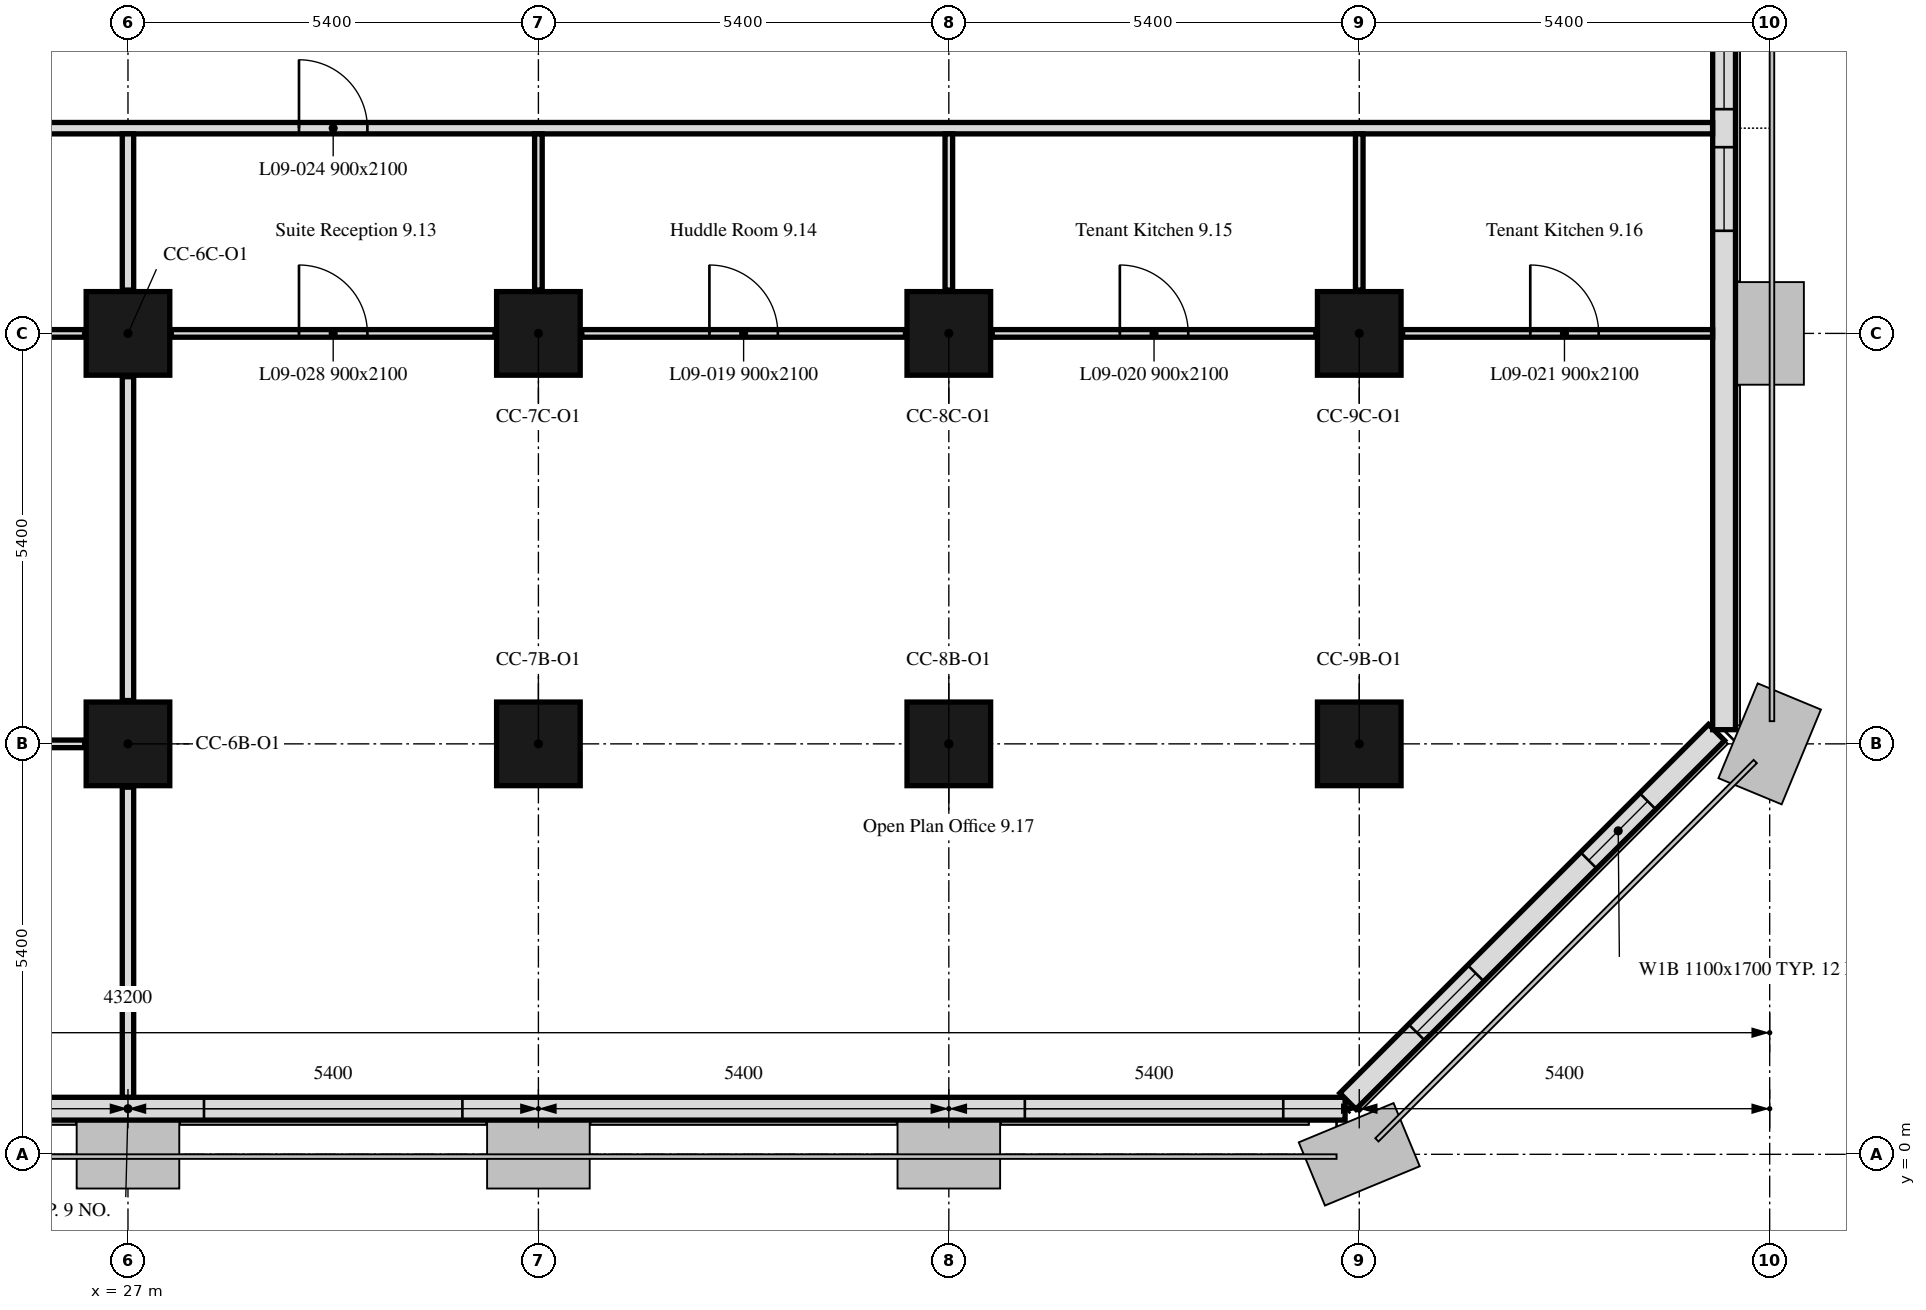
"""IFC4 building model, lengths in metres.
Left out: names, types, materials, properties, quantities, classifications, styles, units other than length and angle.
Written with IfcOpenShell. Run it as: python <this file> out.ifc"""

import sys

from ifc_helpers import new_model, si_unit, direction, frame, frame_2d, origin, origin_2d, place, context, subcontext, project, spatial, rectangle, extrude, element, fill, save


model = new_model("IFC4")
c1 = context("Model", 3, precision=1e-05, world=origin(), true_north=direction((0.0, 1.0)))
c2 = subcontext(c1, "Body", "Model", "MODEL_VIEW")
j1 = project(units=[si_unit("LENGTHUNIT", "METRE"), si_unit("PLANEANGLEUNIT", "RADIAN")], contexts=[c1])
p1 = place(None, origin())
s1 = spatial("IfcSite", under=j1, at=p1, CompositionType="ELEMENT")
p2 = place(p1, origin())
s2 = spatial("IfcBuilding", under=s1, at=p2, CompositionType="ELEMENT")
p3 = place(p2, frame((0.0, 0.0, 45.0)))
s3 = spatial("IfcBuildingStorey", under=s2, at=p3, CompositionType="ELEMENT", Elevation=45.0)
for number, where, z_axis, x_axis in (
    (1, (27.0, 5.4, 0.0), (0.0, 0.0, 1.0), (1.0, 0.0, 0.0)),
    (2, (32.4, 5.4, 0.0), (0.0, 0.0, 1.0), (1.0, 0.0, 0.0)),
    (3, (37.8, 5.4, 0.0), (0.0, 0.0, 1.0), (1.0, 0.0, 0.0)),
    (4, (43.2, 5.4, 0.0), (0.0, 0.0, 1.0), (1.0, 0.0, 0.0)),
    (5, (27.0, 10.8, 0.0), (0.0, 0.0, 1.0), (1.0, 0.0, 0.0)),
    (6, (32.4, 10.8, 0.0), (0.0, 0.0, 1.0), (1.0, 0.0, 0.0)),
    (7, (37.8, 10.8, 0.0), (0.0, 0.0, 1.0), (1.0, 0.0, 0.0)),
    (8, (43.2, 10.8, 0.0), (0.0, 0.0, 1.0), (1.0, 0.0, 0.0)),
):
    element("IfcColumn", number, at=place(p3, frame(where, z_axis=z_axis, x_axis=x_axis)), inside=s3, PredefinedType="COLUMN", context=c2, shape_type="SweptSolid", body=[
        extrude(rectangle(XDim=1.1, YDim=1.1, at=origin_2d()), origin(), (0.0, 0.0, 1.0), 3.5),
    ])
p4 = place(p3, frame((10.986, 0.6, 0.0), z_axis=(0.0, 0.0, 1.0), x_axis=(1.0, 0.0, 0.0)))
e9 = element("IfcWall", 9, at=p4, inside=s3, PredefinedType="SOLIDWALL", context=c2, shape_type="SweptSolid", body=[
    extrude(rectangle(XDim=32.027, YDim=0.3, at=frame_2d((16.014, 0.0))), origin(), (0.0, 0.0, 1.0), 3.5),
])
p5 = place(p4, frame((6.214, 0.0, 0.9)))
e10 = element("IfcOpeningElement", 10, at=p5, cuts=e9, PredefinedType="OPENING", context=c2, shape_type="SweptSolid", body=[
    extrude(rectangle(XDim=3.4, YDim=1.7, at=frame_2d((1.7, 0.85))), frame((0.0, 0.16, 0.0), z_axis=(0.0, -1.0, 0.0), x_axis=(1.0, 0.0, 0.0)), (0.0, 0.0, 1.0), 0.32),
])
p6 = place(p4, frame((17.014, 0.0, 0.9)))
e11 = element("IfcOpeningElement", 11, at=p6, cuts=e9, PredefinedType="OPENING", context=c2, shape_type="SweptSolid", body=[
    extrude(rectangle(XDim=3.4, YDim=1.7, at=frame_2d((1.7, 0.85))), frame((0.0, 0.16, 0.0), z_axis=(0.0, -1.0, 0.0), x_axis=(1.0, 0.0, 0.0)), (0.0, 0.0, 1.0), 0.32),
])
p7 = place(p4, frame((27.814, 0.0, 0.9)))
e12 = element("IfcOpeningElement", 12, at=p7, cuts=e9, PredefinedType="OPENING", context=c2, shape_type="SweptSolid", body=[
    extrude(rectangle(XDim=3.4, YDim=1.7, at=frame_2d((1.7, 0.85))), frame((0.0, 0.16, 0.0), z_axis=(0.0, -1.0, 0.0), x_axis=(1.0, 0.0, 0.0)), (0.0, 0.0, 1.0), 0.32),
])
p8 = place(p3, frame((43.051, 0.699, 0.0), z_axis=(0.0, 0.0, 1.0), x_axis=(0.707106781187, 0.707106781187, 0.0)))
e13 = element("IfcWall", 13, at=p8, inside=s3, PredefinedType="SOLIDWALL", context=c2, shape_type="SweptSolid", body=[
    extrude(rectangle(XDim=6.86, YDim=0.3, at=frame_2d((3.43, 0.0))), origin(), (0.0, 0.0, 1.0), 3.5),
])
p9 = place(p8, frame((1.28, 0.0, 0.9)))
e14 = element("IfcOpeningElement", 14, at=p9, cuts=e13, PredefinedType="OPENING", context=c2, shape_type="SweptSolid", body=[
    extrude(rectangle(XDim=1.1, YDim=1.7, at=frame_2d((0.55, 0.85))), frame((0.0, 0.16, 0.0), z_axis=(0.0, -1.0, 0.0), x_axis=(1.0, 0.0, 0.0)), (0.0, 0.0, 1.0), 0.32),
])
p10 = place(p8, frame((4.48, 0.0, 0.9)))
e15 = element("IfcOpeningElement", 15, at=p10, cuts=e13, PredefinedType="OPENING", context=c2, shape_type="SweptSolid", body=[
    extrude(rectangle(XDim=1.1, YDim=1.7, at=frame_2d((0.55, 0.85))), frame((0.0, 0.16, 0.0), z_axis=(0.0, -1.0, 0.0), x_axis=(1.0, 0.0, 0.0)), (0.0, 0.0, 1.0), 0.32),
])
p11 = place(p3, frame((48.0, 5.586, 0.0), z_axis=(0.0, 0.0, 1.0), x_axis=(0.0, 1.0, 0.0)))
e16 = element("IfcWall", 16, at=p11, inside=s3, PredefinedType="SOLIDWALL", context=c2, shape_type="SweptSolid", body=[
    extrude(rectangle(XDim=32.027, YDim=0.3, at=frame_2d((16.014, 0.0))), origin(), (0.0, 0.0, 1.0), 3.5),
])
p12 = place(p11, frame((6.564, 0.0, 0.9)))
e17 = element("IfcOpeningElement", 17, at=p12, cuts=e16, PredefinedType="OPENING", context=c2, shape_type="SweptSolid", body=[
    extrude(rectangle(XDim=1.1, YDim=1.7, at=frame_2d((0.55, 0.85))), frame((0.0, 0.16, 0.0), z_axis=(0.0, -1.0, 0.0), x_axis=(1.0, 0.0, 0.0)), (0.0, 0.0, 1.0), 0.32),
])
p13 = place(p11, frame((8.164, 0.0, 0.9)))
e18 = element("IfcOpeningElement", 18, at=p13, cuts=e16, PredefinedType="OPENING", context=c2, shape_type="SweptSolid", body=[
    extrude(rectangle(XDim=1.1, YDim=1.7, at=frame_2d((0.55, 0.85))), frame((0.0, 0.16, 0.0), z_axis=(0.0, -1.0, 0.0), x_axis=(1.0, 0.0, 0.0)), (0.0, 0.0, 1.0), 0.32),
])
p14 = place(p11, frame((17.014, 0.0, 0.9)))
e19 = element("IfcOpeningElement", 19, at=p14, cuts=e16, PredefinedType="OPENING", context=c2, shape_type="SweptSolid", body=[
    extrude(rectangle(XDim=3.4, YDim=1.7, at=frame_2d((1.7, 0.85))), frame((0.0, 0.16, 0.0), z_axis=(0.0, -1.0, 0.0), x_axis=(1.0, 0.0, 0.0)), (0.0, 0.0, 1.0), 0.32),
])
p15 = place(p11, frame((28.164, 0.0, 0.9)))
e20 = element("IfcOpeningElement", 20, at=p15, cuts=e16, PredefinedType="OPENING", context=c2, shape_type="SweptSolid", body=[
    extrude(rectangle(XDim=1.1, YDim=1.7, at=frame_2d((0.55, 0.85))), frame((0.0, 0.16, 0.0), z_axis=(0.0, -1.0, 0.0), x_axis=(1.0, 0.0, 0.0)), (0.0, 0.0, 1.0), 0.32),
])
p16 = place(p11, frame((29.764, 0.0, 0.9)))
e21 = element("IfcOpeningElement", 21, at=p16, cuts=e16, PredefinedType="OPENING", context=c2, shape_type="SweptSolid", body=[
    extrude(rectangle(XDim=1.1, YDim=1.7, at=frame_2d((0.55, 0.85))), frame((0.0, 0.16, 0.0), z_axis=(0.0, -1.0, 0.0), x_axis=(1.0, 0.0, 0.0)), (0.0, 0.0, 1.0), 0.32),
])
p17 = place(p3, frame((6.151, 13.5, 0.0), z_axis=(0.0, 0.0, 1.0), x_axis=(1.0, 0.0, 0.0)))
e22 = element("IfcWall", 22, at=p17, inside=s3, PredefinedType="PARTITIONING", context=c2, shape_type="SweptSolid", body=[
    extrude(rectangle(XDim=41.698, YDim=0.15, at=frame_2d((20.849, 0.0))), origin(), (0.0, 0.0, 1.0), 2.75),
])
p18 = place(p17, frame((2.174, 0.0, 0.0)))
e23 = element("IfcOpeningElement", 23, at=p18, cuts=e22, PredefinedType="OPENING", context=c2, shape_type="SweptSolid", body=[
    extrude(rectangle(XDim=0.9, YDim=2.1, at=frame_2d((0.45, 1.05))), frame((0.0, 0.075, 0.0), z_axis=(0.0, -1.0, 0.0), x_axis=(1.0, 0.0, 0.0)), (0.0, 0.0, 1.0), 0.15),
])
p19 = place(p17, frame((23.099, 0.0, 0.0)))
e24 = element("IfcOpeningElement", 24, at=p19, cuts=e22, PredefinedType="OPENING", context=c2, shape_type="SweptSolid", body=[
    extrude(rectangle(XDim=0.9, YDim=2.1, at=frame_2d((0.45, 1.05))), frame((0.0, 0.075, 0.0), z_axis=(0.0, -1.0, 0.0), x_axis=(1.0, 0.0, 0.0)), (0.0, 0.0, 1.0), 0.15),
])
p20 = place(p3, frame((22.17, 10.8, 0.0), z_axis=(0.0, 0.0, 1.0), x_axis=(1.0, 0.0, 0.0)))
e25 = element("IfcWall", 25, at=p20, inside=s3, PredefinedType="PARTITIONING", context=c2, shape_type="SweptSolid", body=[
    extrude(rectangle(XDim=4.26, YDim=0.1, at=frame_2d((2.13, 0.0))), origin(), (0.0, 0.0, 1.0), 3.5),
])
p21 = place(p20, frame((1.68, 0.0, 0.0)))
e26 = element("IfcOpeningElement", 26, at=p21, cuts=e25, PredefinedType="OPENING", context=c2, shape_type="SweptSolid", body=[
    extrude(rectangle(XDim=0.9, YDim=2.1, at=frame_2d((0.45, 1.05))), frame((0.0, 0.05, 0.0), z_axis=(0.0, -1.0, 0.0), x_axis=(1.0, 0.0, 0.0)), (0.0, 0.0, 1.0), 0.1),
])
p22 = place(p3, frame((27.0, 11.37, 0.0), z_axis=(0.0, 0.0, 1.0), x_axis=(0.0, 1.0, 0.0)))
e27 = element("IfcWall", 27, at=p22, inside=s3, PredefinedType="PARTITIONING", context=c2, shape_type="SweptSolid", body=[
    extrude(rectangle(XDim=2.055, YDim=0.15, at=frame_2d((1.027, 0.0))), origin(), (0.0, 0.0, 1.0), 2.75),
])
p23 = place(p3, frame((22.17, 5.4, 0.0), z_axis=(0.0, 0.0, 1.0), x_axis=(1.0, 0.0, 0.0)))
e28 = element("IfcWall", 28, at=p23, inside=s3, PredefinedType="PARTITIONING", context=c2, shape_type="SweptSolid", body=[
    extrude(rectangle(XDim=4.26, YDim=0.1, at=frame_2d((2.13, 0.0))), origin(), (0.0, 0.0, 1.0), 3.5),
])
p24 = place(p23, frame((1.68, 0.0, 0.0)))
e29 = element("IfcOpeningElement", 29, at=p24, cuts=e28, PredefinedType="OPENING", context=c2, shape_type="SweptSolid", body=[
    extrude(rectangle(XDim=0.9, YDim=2.1, at=frame_2d((0.45, 1.05))), frame((0.0, 0.05, 0.0), z_axis=(0.0, -1.0, 0.0), x_axis=(1.0, 0.0, 0.0)), (0.0, 0.0, 1.0), 0.1),
])
p25 = place(p3, frame((27.0, 5.97, 0.0), z_axis=(0.0, 0.0, 1.0), x_axis=(0.0, 1.0, 0.0)))
e30 = element("IfcWall", 30, at=p25, inside=s3, PredefinedType="PARTITIONING", context=c2, shape_type="SweptSolid", body=[
    extrude(rectangle(XDim=4.26, YDim=0.15, at=frame_2d((2.13, 0.0))), origin(), (0.0, 0.0, 1.0), 2.75),
])
p26 = place(p3, frame((27.0, 0.751, 0.0), z_axis=(0.0, 0.0, 1.0), x_axis=(0.0, 1.0, 0.0)))
e31 = element("IfcWall", 31, at=p26, inside=s3, PredefinedType="PARTITIONING", context=c2, shape_type="SweptSolid", body=[
    extrude(rectangle(XDim=4.079, YDim=0.15, at=frame_2d((2.04, 0.0))), origin(), (0.0, 0.0, 1.0), 2.75),
])
p27 = place(p3, frame((27.57, 10.8, 0.0), z_axis=(0.0, 0.0, 1.0), x_axis=(1.0, 0.0, 0.0)))
e32 = element("IfcWall", 32, at=p27, inside=s3, PredefinedType="PARTITIONING", context=c2, shape_type="SweptSolid", body=[
    extrude(rectangle(XDim=4.26, YDim=0.1, at=frame_2d((2.13, 0.0))), origin(), (0.0, 0.0, 1.0), 3.5),
])
p28 = place(p27, frame((1.68, 0.0, 0.0)))
e33 = element("IfcOpeningElement", 33, at=p28, cuts=e32, PredefinedType="OPENING", context=c2, shape_type="SweptSolid", body=[
    extrude(rectangle(XDim=0.9, YDim=2.1, at=frame_2d((0.45, 1.05))), frame((0.0, 0.05, 0.0), z_axis=(0.0, -1.0, 0.0), x_axis=(1.0, 0.0, 0.0)), (0.0, 0.0, 1.0), 0.1),
])
p29 = place(p3, frame((32.4, 11.37, 0.0), z_axis=(0.0, 0.0, 1.0), x_axis=(0.0, 1.0, 0.0)))
e34 = element("IfcWall", 34, at=p29, inside=s3, PredefinedType="PARTITIONING", context=c2, shape_type="SweptSolid", body=[
    extrude(rectangle(XDim=2.055, YDim=0.1, at=frame_2d((1.027, 0.0))), origin(), (0.0, 0.0, 1.0), 2.75),
])
p30 = place(p3, frame((32.97, 10.8, 0.0), z_axis=(0.0, 0.0, 1.0), x_axis=(1.0, 0.0, 0.0)))
e35 = element("IfcWall", 35, at=p30, inside=s3, PredefinedType="PARTITIONING", context=c2, shape_type="SweptSolid", body=[
    extrude(rectangle(XDim=4.26, YDim=0.1, at=frame_2d((2.13, 0.0))), origin(), (0.0, 0.0, 1.0), 2.75),
])
p31 = place(p30, frame((1.68, 0.0, 0.0)))
e36 = element("IfcOpeningElement", 36, at=p31, cuts=e35, PredefinedType="OPENING", context=c2, shape_type="SweptSolid", body=[
    extrude(rectangle(XDim=0.9, YDim=2.1, at=frame_2d((0.45, 1.05))), frame((0.0, 0.05, 0.0), z_axis=(0.0, -1.0, 0.0), x_axis=(1.0, 0.0, 0.0)), (0.0, 0.0, 1.0), 0.1),
])
p32 = place(p3, frame((37.8, 11.37, 0.0), z_axis=(0.0, 0.0, 1.0), x_axis=(0.0, 1.0, 0.0)))
e37 = element("IfcWall", 37, at=p32, inside=s3, PredefinedType="PARTITIONING", context=c2, shape_type="SweptSolid", body=[
    extrude(rectangle(XDim=2.055, YDim=0.1, at=frame_2d((1.027, 0.0))), origin(), (0.0, 0.0, 1.0), 2.75),
])
p33 = place(p3, frame((38.37, 10.8, 0.0), z_axis=(0.0, 0.0, 1.0), x_axis=(1.0, 0.0, 0.0)))
e38 = element("IfcWall", 38, at=p33, inside=s3, PredefinedType="PARTITIONING", context=c2, shape_type="SweptSolid", body=[
    extrude(rectangle(XDim=4.26, YDim=0.1, at=frame_2d((2.13, 0.0))), origin(), (0.0, 0.0, 1.0), 2.75),
])
p34 = place(p33, frame((1.68, 0.0, 0.0)))
e39 = element("IfcOpeningElement", 39, at=p34, cuts=e38, PredefinedType="OPENING", context=c2, shape_type="SweptSolid", body=[
    extrude(rectangle(XDim=0.9, YDim=2.1, at=frame_2d((0.45, 1.05))), frame((0.0, 0.05, 0.0), z_axis=(0.0, -1.0, 0.0), x_axis=(1.0, 0.0, 0.0)), (0.0, 0.0, 1.0), 0.1),
])
p35 = place(p3, frame((43.2, 11.37, 0.0), z_axis=(0.0, 0.0, 1.0), x_axis=(0.0, 1.0, 0.0)))
e40 = element("IfcWall", 40, at=p35, inside=s3, PredefinedType="PARTITIONING", context=c2, shape_type="SweptSolid", body=[
    extrude(rectangle(XDim=2.055, YDim=0.1, at=frame_2d((1.027, 0.0))), origin(), (0.0, 0.0, 1.0), 3.5),
])
p36 = place(p3, frame((43.77, 10.8, 0.0), z_axis=(0.0, 0.0, 1.0), x_axis=(1.0, 0.0, 0.0)))
e41 = element("IfcWall", 41, at=p36, inside=s3, PredefinedType="PARTITIONING", context=c2, shape_type="SweptSolid", body=[
    extrude(rectangle(XDim=4.079, YDim=0.1, at=frame_2d((2.04, 0.0))), origin(), (0.0, 0.0, 1.0), 2.75),
])
p37 = place(p36, frame((1.68, 0.0, 0.0)))
e42 = element("IfcOpeningElement", 42, at=p37, cuts=e41, PredefinedType="OPENING", context=c2, shape_type="SweptSolid", body=[
    extrude(rectangle(XDim=0.9, YDim=2.1, at=frame_2d((0.45, 1.05))), frame((0.0, 0.05, 0.0), z_axis=(0.0, -1.0, 0.0), x_axis=(1.0, 0.0, 0.0)), (0.0, 0.0, 1.0), 0.1),
])
p38 = place(p6, origin())
e43 = element("IfcWindow", 43, at=p38, inside=s3, PartitioningType="SINGLE_PANEL", PredefinedType="WINDOW", context=c2, shape_type="SweptSolid", body=[
    extrude(rectangle(XDim=3.4, YDim=1.7, at=frame_2d((1.7, 0.85))), frame((0.0, 0.03, 0.0), z_axis=(0.0, -1.0, 0.0), x_axis=(1.0, 0.0, 0.0)), (0.0, 0.0, 1.0), 0.06),
])
fill(e11, e43)
p39 = place(p7, origin())
e44 = element("IfcWindow", 44, at=p39, inside=s3, PartitioningType="SINGLE_PANEL", PredefinedType="WINDOW", context=c2, shape_type="SweptSolid", body=[
    extrude(rectangle(XDim=3.4, YDim=1.7, at=frame_2d((1.7, 0.85))), frame((0.0, 0.03, 0.0), z_axis=(0.0, -1.0, 0.0), x_axis=(1.0, 0.0, 0.0)), (0.0, 0.0, 1.0), 0.06),
])
fill(e12, e44)
p40 = place(p9, origin())
e45 = element("IfcWindow", 45, at=p40, inside=s3, PartitioningType="SINGLE_PANEL", PredefinedType="WINDOW", context=c2, shape_type="SweptSolid", body=[
    extrude(rectangle(XDim=1.1, YDim=1.7, at=frame_2d((0.55, 0.85))), frame((0.0, 0.03, 0.0), z_axis=(0.0, -1.0, 0.0), x_axis=(1.0, 0.0, 0.0)), (0.0, 0.0, 1.0), 0.06),
])
fill(e14, e45)
p41 = place(p10, origin())
e46 = element("IfcWindow", 46, at=p41, inside=s3, PartitioningType="SINGLE_PANEL", PredefinedType="WINDOW", context=c2, shape_type="SweptSolid", body=[
    extrude(rectangle(XDim=1.1, YDim=1.7, at=frame_2d((0.55, 0.85))), frame((0.0, 0.03, 0.0), z_axis=(0.0, -1.0, 0.0), x_axis=(1.0, 0.0, 0.0)), (0.0, 0.0, 1.0), 0.06),
])
fill(e15, e46)
p42 = place(p12, origin())
e47 = element("IfcWindow", 47, at=p42, inside=s3, PartitioningType="SINGLE_PANEL", PredefinedType="WINDOW", context=c2, shape_type="SweptSolid", body=[
    extrude(rectangle(XDim=1.1, YDim=1.7, at=frame_2d((0.55, 0.85))), frame((0.0, 0.03, 0.0), z_axis=(0.0, -1.0, 0.0), x_axis=(1.0, 0.0, 0.0)), (0.0, 0.0, 1.0), 0.06),
])
fill(e17, e47)
p43 = place(p13, origin())
e48 = element("IfcWindow", 48, at=p43, inside=s3, PartitioningType="SINGLE_PANEL", PredefinedType="WINDOW", context=c2, shape_type="SweptSolid", body=[
    extrude(rectangle(XDim=1.1, YDim=1.7, at=frame_2d((0.55, 0.85))), frame((0.0, 0.03, 0.0), z_axis=(0.0, -1.0, 0.0), x_axis=(1.0, 0.0, 0.0)), (0.0, 0.0, 1.0), 0.06),
])
fill(e18, e48)
p44 = place(p31, origin())
e49 = element("IfcDoor", 49, at=p44, inside=s3, OperationType="SINGLE_SWING_LEFT", PredefinedType="DOOR", context=c2, shape_type="SweptSolid", body=[
    extrude(rectangle(XDim=0.9, YDim=2.1, at=frame_2d((0.45, 1.05))), frame((0.0, 0.025, 0.0), z_axis=(0.0, -1.0, 0.0), x_axis=(1.0, 0.0, 0.0)), (0.0, 0.0, 1.0), 0.05),
])
fill(e36, e49)
p45 = place(p34, origin())
e50 = element("IfcDoor", 50, at=p45, inside=s3, OperationType="SINGLE_SWING_LEFT", PredefinedType="DOOR", context=c2, shape_type="SweptSolid", body=[
    extrude(rectangle(XDim=0.9, YDim=2.1, at=frame_2d((0.45, 1.05))), frame((0.0, 0.025, 0.0), z_axis=(0.0, -1.0, 0.0), x_axis=(1.0, 0.0, 0.0)), (0.0, 0.0, 1.0), 0.05),
])
fill(e39, e50)
p46 = place(p37, origin())
e51 = element("IfcDoor", 51, at=p46, inside=s3, OperationType="SINGLE_SWING_RIGHT", PredefinedType="DOOR", context=c2, shape_type="SweptSolid", body=[
    extrude(rectangle(XDim=0.9, YDim=2.1, at=frame_2d((0.45, 1.05))), frame((0.0, 0.025, 0.0), z_axis=(0.0, -1.0, 0.0), x_axis=(1.0, 0.0, 0.0)), (0.0, 0.0, 1.0), 0.05),
])
fill(e42, e51)
p47 = place(p19, origin())
e52 = element("IfcDoor", 52, at=p47, inside=s3, OperationType="SINGLE_SWING_LEFT", PredefinedType="DOOR", context=c2, shape_type="SweptSolid", body=[
    extrude(rectangle(XDim=0.9, YDim=2.1, at=frame_2d((0.45, 1.05))), frame((0.0, 0.025, 0.0), z_axis=(0.0, -1.0, 0.0), x_axis=(1.0, 0.0, 0.0)), (0.0, 0.0, 1.0), 0.05),
])
fill(e24, e52)
p48 = place(p28, origin())
e53 = element("IfcDoor", 53, at=p48, inside=s3, OperationType="SINGLE_SWING_RIGHT", PredefinedType="DOOR", context=c2, shape_type="SweptSolid", body=[
    extrude(rectangle(XDim=0.9, YDim=2.1, at=frame_2d((0.45, 1.05))), frame((0.0, 0.025, 0.0), z_axis=(0.0, -1.0, 0.0), x_axis=(1.0, 0.0, 0.0)), (0.0, 0.0, 1.0), 0.05),
])
fill(e33, e53)
save(model, sys.argv[1])
